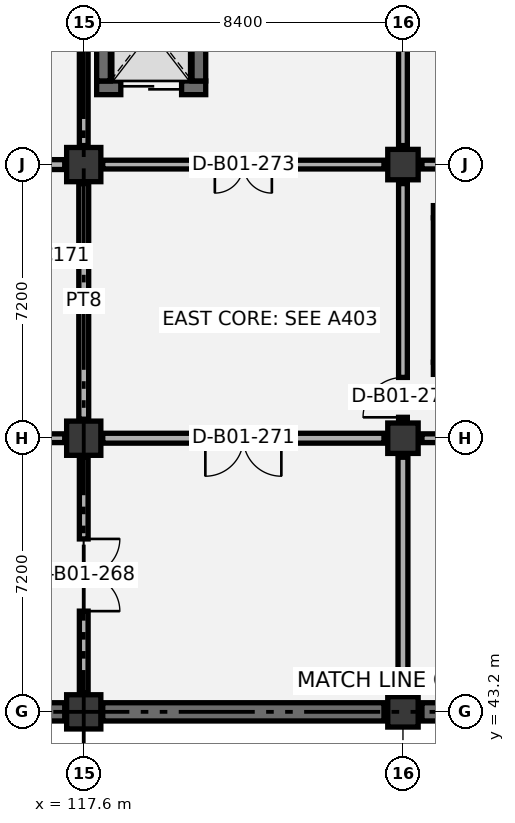
"""IFC4 building model, lengths in metres.
Left out: names, types, materials, properties, quantities, classifications, styles, units other than length and angle.
Written with IfcOpenShell. Run it as: python <this file> out.ifc"""

import sys

from ifc_helpers import new_model, si_unit, direction, frame, frame_2d, origin, origin_2d, place, context, subcontext, project, spatial, rectangle, extrude, element, fill, save


model = new_model("IFC4")
c1 = context("Model", 3, precision=1e-05, world=origin(), true_north=direction((0.0, 1.0)))
c2 = subcontext(c1, "Body", "Model", "MODEL_VIEW")
j1 = project(units=[si_unit("LENGTHUNIT", "METRE"), si_unit("PLANEANGLEUNIT", "RADIAN")], contexts=[c1])
p1 = place(None, origin())
s1 = spatial("IfcSite", under=j1, at=p1, CompositionType="ELEMENT")
p2 = place(p1, origin())
s2 = spatial("IfcBuilding", under=s1, at=p2, CompositionType="ELEMENT")
p3 = place(p2, frame((0.0, 0.0, -4.8)))
s3 = spatial("IfcBuildingStorey", under=s2, at=p3, CompositionType="ELEMENT", Elevation=-4.8)
for number, where, z_axis, x_axis in (
    (1, (117.6, 43.2, 0.0), (0.0, 0.0, 1.0), (1.0, 0.0, 0.0)),
    (2, (117.6, 50.4, 0.0), (0.0, 0.0, 1.0), (1.0, 0.0, 0.0)),
    (3, (117.6, 57.6, 0.0), (0.0, 0.0, 1.0), (1.0, 0.0, 0.0)),
):
    element("IfcColumn", number, at=place(p3, frame(where, z_axis=z_axis, x_axis=x_axis)), inside=s3, PredefinedType="COLUMN", context=c2, shape_type="SweptSolid", body=[
        extrude(rectangle(XDim=0.9, YDim=0.9, at=origin_2d()), origin(), (0.0, 0.0, 1.0), 4.8),
    ])
for number, where, z_axis, x_axis in (
    (4, (126.0, 43.2, 0.0), (0.0, 0.0, 1.0), (1.0, 0.0, 0.0)),
    (5, (126.0, 50.4, 0.0), (0.0, 0.0, 1.0), (1.0, 0.0, 0.0)),
    (6, (126.0, 57.6, 0.0), (0.0, 0.0, 1.0), (1.0, 0.0, 0.0)),
):
    element("IfcColumn", number, at=place(p3, frame(where, z_axis=z_axis, x_axis=x_axis)), inside=s3, PredefinedType="COLUMN", context=c2, shape_type="SweptSolid", body=[
        extrude(rectangle(XDim=0.8, YDim=0.8, at=origin_2d()), origin(), (0.0, 0.0, 1.0), 4.8),
    ])
p4 = place(p3, frame((109.7, 43.2, 0.0), z_axis=(0.0, 0.0, 1.0), x_axis=(1.0, 0.0, 0.0)))
e7 = element("IfcWall", 7, at=p4, inside=s3, PredefinedType="USERDEFINED", context=c2, shape_type="SweptSolid", body=[
    extrude(rectangle(XDim=7.4, YDim=0.48, at=frame_2d((3.7, 0.0))), origin(), (0.0, 0.0, 1.0), 4.45),
])
for number, where, z_axis, x_axis in (
    (8, (118.1, 43.2, 0.0), (0.0, 0.0, 1.0), (1.0, 0.0, 0.0)),
    (9, (126.5, 43.2, 0.0), (0.0, 0.0, 1.0), (1.0, 0.0, 0.0)),
):
    element("IfcWall", number, at=place(p3, frame(where, z_axis=z_axis, x_axis=x_axis)), inside=s3, PredefinedType="USERDEFINED", context=c2, shape_type="SweptSolid", body=[
        extrude(rectangle(XDim=7.4, YDim=0.48, at=frame_2d((3.7, 0.0))), origin(), (0.0, 0.0, 1.0), 4.45),
    ])
p5 = place(p3, frame((126.8, 52.24, 0.0), z_axis=(0.0, 0.0, 1.0), x_axis=(1.0, 0.0, 0.0)))
e10 = element("IfcWall", 10, at=p5, inside=s3, PredefinedType="SHEAR", context=c2, shape_type="SweptSolid", body=[
    extrude(rectangle(XDim=7.48, YDim=0.32, at=frame_2d((3.74, 0.0))), origin(), (0.0, 0.0, 1.0), 4.45),
])
p6 = place(p5, frame((0.45, 0.0, 0.0)))
e11 = element("IfcOpeningElement", 11, at=p6, cuts=e10, PredefinedType="OPENING", context=c2, shape_type="SweptSolid", body=[
    extrude(rectangle(XDim=1.05, YDim=2.15, at=frame_2d((0.525, 1.075))), frame((0.0, 0.17, 0.0), z_axis=(0.0, -1.0, 0.0), x_axis=(1.0, 0.0, 0.0)), (0.0, 0.0, 1.0), 0.34),
])
p7 = place(p3, frame((126.8, 56.36, 0.0), z_axis=(0.0, 0.0, 1.0), x_axis=(1.0, 0.0, 0.0)))
e12 = element("IfcWall", 12, at=p7, inside=s3, PredefinedType="SHEAR", context=c2, shape_type="SweptSolid", body=[
    extrude(rectangle(XDim=7.48, YDim=0.32, at=frame_2d((3.74, 0.0))), origin(), (0.0, 0.0, 1.0), 4.45),
])
p8 = place(p3, frame((126.96, 52.4, 0.0), z_axis=(0.0, 0.0, 1.0), x_axis=(0.0, 1.0, 0.0)))
e13 = element("IfcWall", 13, at=p8, inside=s3, PredefinedType="SHEAR", context=c2, shape_type="SweptSolid", body=[
    extrude(rectangle(XDim=3.8, YDim=0.32, at=frame_2d((1.9, 0.0))), origin(), (0.0, 0.0, 1.0), 4.45),
])
p9 = place(p3, frame((117.94, 59.62, 0.0), z_axis=(0.0, 0.0, 1.0), x_axis=(1.0, 0.0, 0.0)))
e14 = element("IfcWall", 14, at=p9, inside=s3, PredefinedType="SHEAR", context=c2, shape_type="SweptSolid", body=[
    extrude(rectangle(XDim=2.87, YDim=0.36, at=frame_2d((1.435, 0.0))), origin(), (0.0, 0.0, 1.0), 4.45),
])
p10 = place(p9, frame((0.635, 0.0, 0.0)))
e15 = element("IfcOpeningElement", 15, at=p10, cuts=e14, PredefinedType="OPENING", context=c2, shape_type="SweptSolid", body=[
    extrude(rectangle(XDim=1.6, YDim=2.25, at=frame_2d((0.8, 1.125))), frame((0.0, 0.19, 0.0), z_axis=(0.0, -1.0, 0.0), x_axis=(1.0, 0.0, 0.0)), (0.0, 0.0, 1.0), 0.38),
])
for number, where, z_axis, x_axis in (
    (16, (118.12, 59.8, 0.0), (0.0, 0.0, 1.0), (0.0, 1.0, 0.0)),
    (17, (120.63, 59.8, 0.0), (0.0, 0.0, 1.0), (0.0, 1.0, 0.0)),
):
    element("IfcWall", number, at=place(p3, frame(where, z_axis=z_axis, x_axis=x_axis)), inside=s3, PredefinedType="SHEAR", context=c2, shape_type="SweptSolid", body=[
        extrude(rectangle(XDim=2.8, YDim=0.36, at=frame_2d((1.4, 0.0))), origin(), (0.0, 0.0, 1.0), 4.45),
    ])
p11 = place(p3, frame((109.35, 55.2, 0.0), z_axis=(0.0, 0.0, 1.0), x_axis=(1.0, 0.0, 0.0)))
e18 = element("IfcWall", 18, at=p11, inside=s3, PredefinedType="PARTITIONING", context=c2, shape_type="SweptSolid", body=[
    extrude(rectangle(XDim=8.1, YDim=0.12, at=frame_2d((4.05, 0.0))), origin(), (0.0, 0.0, 1.0), 4.45),
])
p12 = place(p11, frame((1.08, 0.0, 0.0)))
e19 = element("IfcOpeningElement", 19, at=p12, cuts=e18, PredefinedType="OPENING", context=c2, shape_type="SweptSolid", body=[
    extrude(rectangle(XDim=0.95, YDim=2.1, at=frame_2d((0.475, 1.05))), frame((0.0, 0.07, 0.0), z_axis=(0.0, -1.0, 0.0), x_axis=(1.0, 0.0, 0.0)), (0.0, 0.0, 1.0), 0.14),
])
p13 = place(p11, frame((3.63, 0.0, 0.0)))
e20 = element("IfcOpeningElement", 20, at=p13, cuts=e18, PredefinedType="OPENING", context=c2, shape_type="SweptSolid", body=[
    extrude(rectangle(XDim=0.9, YDim=2.1, at=frame_2d((0.45, 1.05))), frame((0.0, 0.07, 0.0), z_axis=(0.0, -1.0, 0.0), x_axis=(1.0, 0.0, 0.0)), (0.0, 0.0, 1.0), 0.14),
])
p14 = place(p11, frame((6.13, 0.0, 0.0)))
e21 = element("IfcOpeningElement", 21, at=p14, cuts=e18, PredefinedType="OPENING", context=c2, shape_type="SweptSolid", body=[
    extrude(rectangle(XDim=1.0, YDim=2.1, at=frame_2d((0.5, 1.05))), frame((0.0, 0.07, 0.0), z_axis=(0.0, -1.0, 0.0), x_axis=(1.0, 0.0, 0.0)), (0.0, 0.0, 1.0), 0.14),
])
p15 = place(p3, frame((117.6, 43.7, 0.0), z_axis=(0.0, 0.0, 1.0), x_axis=(0.0, 1.0, 0.0)))
e22 = element("IfcWall", 22, at=p15, inside=s3, PredefinedType="PARTITIONING", context=c2, shape_type="SweptSolid", body=[
    extrude(rectangle(XDim=6.2, YDim=0.23, at=frame_2d((3.1, 0.0))), origin(), (0.0, 0.0, 1.0), 3.645),
])
p16 = place(p15, frame((2.15, 0.0, 0.0)))
e23 = element("IfcOpeningElement", 23, at=p16, cuts=e22, PredefinedType="OPENING", context=c2, shape_type="SweptSolid", body=[
    extrude(rectangle(XDim=1.9, YDim=2.3, at=frame_2d((0.95, 1.15))), frame((0.0, 0.125, 0.0), z_axis=(0.0, -1.0, 0.0), x_axis=(1.0, 0.0, 0.0)), (0.0, 0.0, 1.0), 0.25),
])
p17 = place(p3, frame((109.7, 50.4, 0.0), z_axis=(0.0, 0.0, 1.0), x_axis=(1.0, 0.0, 0.0)))
e24 = element("IfcWall", 24, at=p17, inside=s3, PredefinedType="PARTITIONING", context=c2, shape_type="SweptSolid", body=[
    extrude(rectangle(XDim=7.4, YDim=0.23, at=frame_2d((3.7, 0.0))), origin(), (0.0, 0.0, 1.0), 3.545),
])
p18 = place(p3, frame((117.6, 50.9, 0.0), z_axis=(0.0, 0.0, 1.0), x_axis=(0.0, 1.0, 0.0)))
e25 = element("IfcWall", 25, at=p18, inside=s3, PredefinedType="PARTITIONING", context=c2, shape_type="SweptSolid", body=[
    extrude(rectangle(XDim=6.2, YDim=0.26, at=frame_2d((3.1, 0.0))), origin(), (0.0, 0.0, 1.0), 3.645),
])
p19 = place(p3, frame((109.7, 57.6, 0.0), z_axis=(0.0, 0.0, 1.0), x_axis=(1.0, 0.0, 0.0)))
e26 = element("IfcWall", 26, at=p19, inside=s3, PredefinedType="PARTITIONING", context=c2, shape_type="SweptSolid", body=[
    extrude(rectangle(XDim=7.4, YDim=0.26, at=frame_2d((3.7, 0.0))), origin(), (0.0, 0.0, 1.0), 3.545),
])
p20 = place(p19, frame((2.7, 0.0, 0.0)))
e27 = element("IfcOpeningElement", 27, at=p20, cuts=e26, PredefinedType="OPENING", context=c2, shape_type="SweptSolid", body=[
    extrude(rectangle(XDim=2.0, YDim=2.35, at=frame_2d((1.0, 1.175))), frame((0.0, 0.14, 0.0), z_axis=(0.0, -1.0, 0.0), x_axis=(1.0, 0.0, 0.0)), (0.0, 0.0, 1.0), 0.28),
])
p21 = place(p3, frame((117.6, 58.1, 0.0), z_axis=(0.0, 0.0, 1.0), x_axis=(0.0, 1.0, 0.0)))
e28 = element("IfcWall", 28, at=p21, inside=s3, PredefinedType="PARTITIONING", context=c2, shape_type="SweptSolid", body=[
    extrude(rectangle(XDim=6.2, YDim=0.23, at=frame_2d((3.1, 0.0))), origin(), (0.0, 0.0, 1.0), 3.645),
])
p22 = place(p3, frame((126.0, 43.7, 0.0), z_axis=(0.0, 0.0, 1.0), x_axis=(0.0, 1.0, 0.0)))
e29 = element("IfcWall", 29, at=p22, inside=s3, PredefinedType="PARTITIONING", context=c2, shape_type="SweptSolid", body=[
    extrude(rectangle(XDim=6.2, YDim=0.26, at=frame_2d((3.1, 0.0))), origin(), (0.0, 0.0, 1.0), 3.645),
])
p23 = place(p3, frame((118.1, 50.4, 0.0), z_axis=(0.0, 0.0, 1.0), x_axis=(1.0, 0.0, 0.0)))
e30 = element("IfcWall", 30, at=p23, inside=s3, PredefinedType="PARTITIONING", context=c2, shape_type="SweptSolid", body=[
    extrude(rectangle(XDim=7.4, YDim=0.26, at=frame_2d((3.7, 0.0))), origin(), (0.0, 0.0, 1.0), 3.545),
])
p24 = place(p23, frame((2.7, 0.0, 0.0)))
e31 = element("IfcOpeningElement", 31, at=p24, cuts=e30, PredefinedType="OPENING", context=c2, shape_type="SweptSolid", body=[
    extrude(rectangle(XDim=2.0, YDim=2.35, at=frame_2d((1.0, 1.175))), frame((0.0, 0.14, 0.0), z_axis=(0.0, -1.0, 0.0), x_axis=(1.0, 0.0, 0.0)), (0.0, 0.0, 1.0), 0.28),
])
p25 = place(p3, frame((126.0, 50.9, 0.0), z_axis=(0.0, 0.0, 1.0), x_axis=(0.0, 1.0, 0.0)))
e32 = element("IfcWall", 32, at=p25, inside=s3, PredefinedType="PARTITIONING", context=c2, shape_type="SweptSolid", body=[
    extrude(rectangle(XDim=6.2, YDim=0.23, at=frame_2d((3.1, 0.0))), origin(), (0.0, 0.0, 1.0), 3.645),
])
p26 = place(p25, frame((0.05, 0.0, 0.0)))
e33 = element("IfcOpeningElement", 33, at=p26, cuts=e32, PredefinedType="OPENING", context=c2, shape_type="SweptSolid", body=[
    extrude(rectangle(XDim=1.05, YDim=2.15, at=frame_2d((0.525, 1.075))), frame((0.0, 0.125, 0.0), z_axis=(0.0, -1.0, 0.0), x_axis=(1.0, 0.0, 0.0)), (0.0, 0.0, 1.0), 0.25),
])
p27 = place(p3, frame((118.1, 57.6, 0.0), z_axis=(0.0, 0.0, 1.0), x_axis=(1.0, 0.0, 0.0)))
e34 = element("IfcWall", 34, at=p27, inside=s3, PredefinedType="PARTITIONING", context=c2, shape_type="SweptSolid", body=[
    extrude(rectangle(XDim=7.4, YDim=0.23, at=frame_2d((3.7, 0.0))), origin(), (0.0, 0.0, 1.0), 3.545),
])
p28 = place(p27, frame((2.95, 0.0, 0.0)))
e35 = element("IfcOpeningElement", 35, at=p28, cuts=e34, PredefinedType="OPENING", context=c2, shape_type="SweptSolid", body=[
    extrude(rectangle(XDim=1.5, YDim=2.15, at=frame_2d((0.75, 1.075))), frame((0.0, 0.125, 0.0), z_axis=(0.0, -1.0, 0.0), x_axis=(1.0, 0.0, 0.0)), (0.0, 0.0, 1.0), 0.25),
])
p29 = place(p3, frame((126.0, 58.1, 0.0), z_axis=(0.0, 0.0, 1.0), x_axis=(0.0, 1.0, 0.0)))
e36 = element("IfcWall", 36, at=p29, inside=s3, PredefinedType="PARTITIONING", context=c2, shape_type="SweptSolid", body=[
    extrude(rectangle(XDim=6.2, YDim=0.23, at=frame_2d((3.1, 0.0))), origin(), (0.0, 0.0, 1.0), 3.645),
])
p30 = place(p3, frame((126.5, 50.4, 0.0), z_axis=(0.0, 0.0, 1.0), x_axis=(1.0, 0.0, 0.0)))
e37 = element("IfcWall", 37, at=p30, inside=s3, PredefinedType="PARTITIONING", context=c2, shape_type="SweptSolid", body=[
    extrude(rectangle(XDim=7.4, YDim=0.23, at=frame_2d((3.7, 0.0))), origin(), (0.0, 0.0, 1.0), 3.545),
])
p31 = place(p30, frame((2.95, 0.0, 0.0)))
e38 = element("IfcOpeningElement", 38, at=p31, cuts=e37, PredefinedType="OPENING", context=c2, shape_type="SweptSolid", body=[
    extrude(rectangle(XDim=1.5, YDim=2.15, at=frame_2d((0.75, 1.075))), frame((0.0, 0.125, 0.0), z_axis=(0.0, -1.0, 0.0), x_axis=(1.0, 0.0, 0.0)), (0.0, 0.0, 1.0), 0.25),
])
p32 = place(p3, frame((126.5, 57.6, 0.0), z_axis=(0.0, 0.0, 1.0), x_axis=(1.0, 0.0, 0.0)))
e39 = element("IfcWall", 39, at=p32, inside=s3, PredefinedType="PARTITIONING", context=c2, shape_type="SweptSolid", body=[
    extrude(rectangle(XDim=7.4, YDim=0.23, at=frame_2d((3.7, 0.0))), origin(), (0.0, 0.0, 1.0), 3.545),
])
p33 = place(p10, origin())
e40 = element("IfcDoor", 40, at=p33, inside=s3, OperationType="DOUBLE_DOOR_SLIDING", PredefinedType="DOOR", context=c2, shape_type="SweptSolid", body=[
    extrude(rectangle(XDim=1.6, YDim=2.25, at=frame_2d((0.8, 1.125))), frame((0.0, 0.025, 0.0), z_axis=(0.0, -1.0, 0.0), x_axis=(1.0, 0.0, 0.0)), (0.0, 0.0, 1.0), 0.05),
])
fill(e15, e40)
p34 = place(p16, frame((1.9, 0.0, 0.0), z_axis=(0.0, 0.0, 1.0), x_axis=(-1.0, 0.0, 0.0)))
e41 = element("IfcDoor", 41, at=p34, inside=s3, OperationType="DOUBLE_DOOR_SINGLE_SWING", PredefinedType="DOOR", context=c2, shape_type="SweptSolid", body=[
    extrude(rectangle(XDim=1.9, YDim=2.3, at=frame_2d((0.95, 1.15))), frame((0.0, 0.025, 0.0), z_axis=(0.0, -1.0, 0.0), x_axis=(1.0, 0.0, 0.0)), (0.0, 0.0, 1.0), 0.05),
])
fill(e23, e41)
p35 = place(p24, frame((2.0, 0.0, 0.0), z_axis=(0.0, 0.0, 1.0), x_axis=(-1.0, 0.0, 0.0)))
e42 = element("IfcDoor", 42, at=p35, inside=s3, OperationType="DOUBLE_DOOR_SINGLE_SWING", PredefinedType="DOOR", context=c2, shape_type="SweptSolid", body=[
    extrude(rectangle(XDim=2.0, YDim=2.35, at=frame_2d((1.0, 1.175))), frame((0.0, 0.025, 0.0), z_axis=(0.0, -1.0, 0.0), x_axis=(1.0, 0.0, 0.0)), (0.0, 0.0, 1.0), 0.05),
])
fill(e31, e42)
p36 = place(p26, origin())
e43 = element("IfcDoor", 43, at=p36, inside=s3, OperationType="SINGLE_SWING_LEFT", PredefinedType="DOOR", context=c2, shape_type="SweptSolid", body=[
    extrude(rectangle(XDim=1.05, YDim=2.15, at=frame_2d((0.525, 1.075))), frame((0.0, 0.025, 0.0), z_axis=(0.0, -1.0, 0.0), x_axis=(1.0, 0.0, 0.0)), (0.0, 0.0, 1.0), 0.05),
])
fill(e33, e43)
p37 = place(p28, frame((1.5, 0.0, 0.0), z_axis=(0.0, 0.0, 1.0), x_axis=(-1.0, 0.0, 0.0)))
e44 = element("IfcDoor", 44, at=p37, inside=s3, OperationType="DOUBLE_DOOR_SINGLE_SWING", PredefinedType="DOOR", context=c2, shape_type="SweptSolid", body=[
    extrude(rectangle(XDim=1.5, YDim=2.15, at=frame_2d((0.75, 1.075))), frame((0.0, 0.025, 0.0), z_axis=(0.0, -1.0, 0.0), x_axis=(1.0, 0.0, 0.0)), (0.0, 0.0, 1.0), 0.05),
])
fill(e35, e44)
save(model, sys.argv[1])
